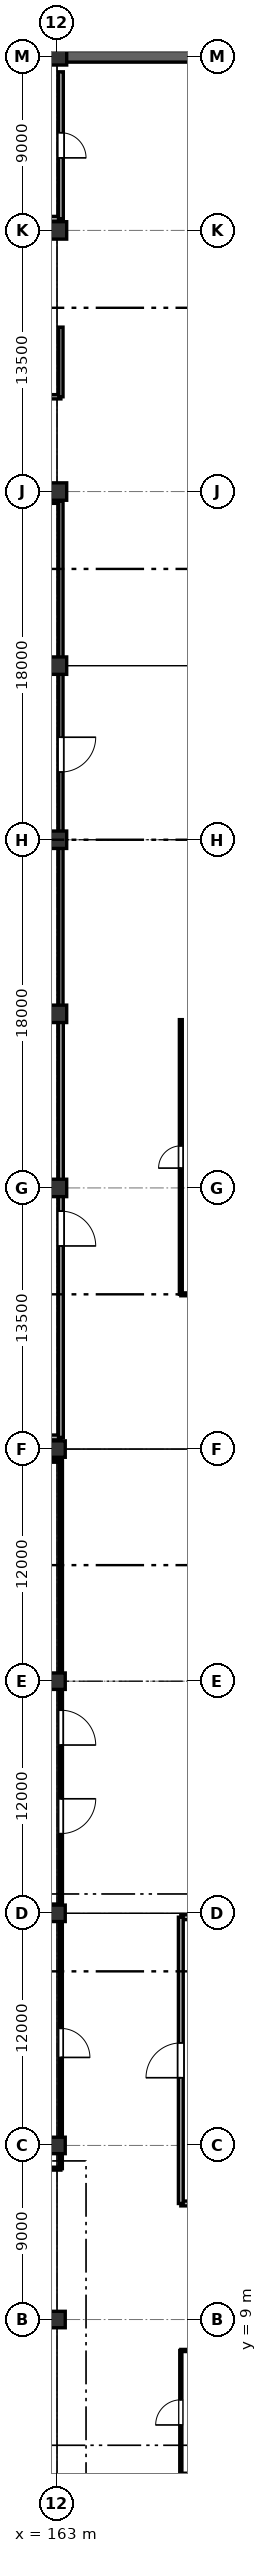
"""IFC4 building model, lengths in metres.
Left out: names, types, materials, properties, quantities, classifications, styles, units other than length and angle.
Written with IfcOpenShell. Run it as: python <this file> out.ifc"""

import sys

from ifc_helpers import new_model, si_unit, direction, frame, frame_2d, origin, origin_2d, place, context, subcontext, project, spatial, rectangle, extrude, element, fill, save


model = new_model("IFC4")
c1 = context("Model", 3, precision=1e-05, world=origin(), true_north=direction((0.0, 1.0)))
c2 = subcontext(c1, "Body", "Model", "MODEL_VIEW")
j1 = project(units=[si_unit("LENGTHUNIT", "METRE"), si_unit("PLANEANGLEUNIT", "RADIAN")], contexts=[c1])
p1 = place(None, origin())
s1 = spatial("IfcSite", under=j1, at=p1, CompositionType="ELEMENT")
p2 = place(p1, origin())
s2 = spatial("IfcBuilding", under=s1, at=p2, CompositionType="ELEMENT")
p3 = place(p2, frame((0.0, 0.0, -5.4)))
s3 = spatial("IfcBuildingStorey", under=s2, at=p3, CompositionType="ELEMENT", Elevation=-5.4)
for number, where, z_axis, x_axis in (
    (1, (163.0, 9.0, 0.0), (0.0, 0.0, 1.0), (1.0, 0.0, 0.0)),
    (2, (163.0, 18.0, 0.0), (0.0, 0.0, 1.0), (1.0, 0.0, 0.0)),
    (3, (163.0, 30.0, 0.0), (0.0, 0.0, 1.0), (1.0, 0.0, 0.0)),
    (4, (163.0, 42.0, 0.0), (0.0, 0.0, 1.0), (1.0, 0.0, 0.0)),
    (5, (163.0, 54.0, 0.0), (0.0, 0.0, 1.0), (1.0, 0.0, 0.0)),
):
    element("IfcColumn", number, at=place(p3, frame(where, z_axis=z_axis, x_axis=x_axis)), inside=s3, PredefinedType="COLUMN", context=c2, shape_type="SweptSolid", body=[
        extrude(rectangle(XDim=0.85, YDim=0.85, at=origin_2d()), origin(), (0.0, 0.0, 1.0), 5.4),
    ])
for number, where, z_axis, x_axis in (
    (6, (163.0, 67.5, 0.0), (0.0, 0.0, 1.0), (1.0, 0.0, 0.0)),
    (7, (163.0, 76.5, 0.0), (0.0, 0.0, 1.0), (1.0, 0.0, 0.0)),
    (8, (163.0, 85.5, 0.0), (0.0, 0.0, 1.0), (1.0, 0.0, 0.0)),
    (9, (163.0, 94.5, 0.0), (0.0, 0.0, 1.0), (1.0, 0.0, 0.0)),
    (10, (163.0, 103.5, 0.0), (0.0, 0.0, 1.0), (1.0, 0.0, 0.0)),
    (11, (163.0, 117.0, 0.0), (0.0, 0.0, 1.0), (1.0, 0.0, 0.0)),
    (12, (163.0, 126.0, 0.0), (0.0, 0.0, 1.0), (1.0, 0.0, 0.0)),
):
    element("IfcColumn", number, at=place(p3, frame(where, z_axis=z_axis, x_axis=x_axis)), inside=s3, PredefinedType="COLUMN", context=c2, shape_type="SweptSolid", body=[
        extrude(rectangle(XDim=1.0, YDim=0.9, at=origin_2d()), origin(), (0.0, 0.0, 1.0), 5.4),
    ])
p4 = place(p3, frame((188.0, 126.0, 0.0), z_axis=(0.0, 0.0, 1.0), x_axis=(-1.0, 0.0, 0.0)))
e13 = element("IfcWall", 13, at=p4, inside=s3, PredefinedType="USERDEFINED", context=c2, shape_type="SweptSolid", body=[
    extrude(rectangle(XDim=52.0, YDim=0.6, at=frame_2d((26.0, 0.0))), origin(), (0.0, 0.0, 1.0), 5.1),
])
for number, where, z_axis, x_axis in (
    (14, (163.2, 30.4, 0.0), (0.0, 0.0, 1.0), (-1.0, 0.0, 0.0)),
    (15, (136.8, 53.4, 0.0), (0.0, 0.0, 1.0), (1.0, 0.0, 0.0)),
):
    element("IfcWall", number, at=place(p3, frame(where, z_axis=z_axis, x_axis=x_axis)), inside=s3, PredefinedType="PARTITIONING", context=c2, shape_type="SweptSolid", body=[
        extrude(rectangle(XDim=26.4, YDim=0.16, at=frame_2d((13.2, 0.0))), origin(), (0.0, 0.0, 1.0), 4.4),
    ])
p5 = place(p3, frame((163.2, 53.4, 0.0), z_axis=(0.0, 0.0, 1.0), x_axis=(0.0, -1.0, 0.0)))
e16 = element("IfcWall", 16, at=p5, inside=s3, PredefinedType="PARTITIONING", context=c2, shape_type="SweptSolid", body=[
    extrude(rectangle(XDim=23.0, YDim=0.16, at=frame_2d((11.5, 0.0))), origin(), (0.0, 0.0, 1.0), 4.4),
])
p6 = place(p5, frame((12.9, 0.0, 0.0)))
e17 = element("IfcOpeningElement", 17, at=p6, cuts=e16, PredefinedType="OPENING", context=c2, shape_type="SweptSolid", body=[
    extrude(rectangle(XDim=1.8, YDim=2.2, at=frame_2d((0.9, 1.1))), frame((0.0, 0.09, 0.0), z_axis=(0.0, -1.0, 0.0), x_axis=(1.0, 0.0, 0.0)), (0.0, 0.0, 1.0), 0.18),
])
p7 = place(p5, frame((17.48, 0.0, 0.0)))
e18 = element("IfcOpeningElement", 18, at=p7, cuts=e16, PredefinedType="OPENING", context=c2, shape_type="SweptSolid", body=[
    extrude(rectangle(XDim=1.8, YDim=2.2, at=frame_2d((0.9, 1.1))), frame((0.0, 0.09, 0.0), z_axis=(0.0, -1.0, 0.0), x_axis=(1.0, 0.0, 0.0)), (0.0, 0.0, 1.0), 0.18),
])
p8 = place(p3, frame((163.2, 16.8, 0.0), z_axis=(0.0, 0.0, 1.0), x_axis=(-1.0, 0.0, 0.0)))
e19 = element("IfcWall", 19, at=p8, inside=s3, PredefinedType="PARTITIONING", context=c2, shape_type="SweptSolid", body=[
    extrude(rectangle(XDim=10.6, YDim=0.15, at=frame_2d((5.3, 0.0))), origin(), (0.0, 0.0, 1.0), 4.4),
])
p9 = place(p3, frame((163.2, 29.8, 0.0), z_axis=(0.0, 0.0, 1.0), x_axis=(0.0, -1.0, 0.0)))
e20 = element("IfcWall", 20, at=p9, inside=s3, PredefinedType="PARTITIONING", context=c2, shape_type="SweptSolid", body=[
    extrude(rectangle(XDim=13.0, YDim=0.15, at=frame_2d((6.5, 0.0))), origin(), (0.0, 0.0, 1.0), 4.4),
])
p10 = place(p9, frame((5.75, 0.0, 0.0)))
e21 = element("IfcOpeningElement", 21, at=p10, cuts=e20, PredefinedType="OPENING", context=c2, shape_type="SweptSolid", body=[
    extrude(rectangle(XDim=1.5, YDim=2.15, at=frame_2d((0.75, 1.075))), frame((0.0, 0.085, 0.0), z_axis=(0.0, -1.0, 0.0), x_axis=(1.0, 0.0, 0.0)), (0.0, 0.0, 1.0), 0.17),
])
for number, where, z_axis, x_axis in (
    (22, (163.2, 54.6, 0.0), (0.0, 0.0, 1.0), (-1.0, 0.0, 0.0)),
    (23, (136.8, 76.2, 0.0), (0.0, 0.0, 1.0), (1.0, 0.0, 0.0)),
):
    element("IfcWall", number, at=place(p3, frame(where, z_axis=z_axis, x_axis=x_axis)), inside=s3, PredefinedType="SOLIDWALL", context=c2, shape_type="SweptSolid", body=[
        extrude(rectangle(XDim=26.4, YDim=0.25, at=frame_2d((13.2, 0.0))), origin(), (0.0, 0.0, 1.0), 4.4),
    ])
p11 = place(p3, frame((163.2, 76.2, 0.0), z_axis=(0.0, 0.0, 1.0), x_axis=(0.0, -1.0, 0.0)))
e24 = element("IfcWall", 24, at=p11, inside=s3, PredefinedType="SOLIDWALL", context=c2, shape_type="SweptSolid", body=[
    extrude(rectangle(XDim=21.6, YDim=0.25, at=frame_2d((10.8, 0.0))), origin(), (0.0, 0.0, 1.0), 4.4),
])
p12 = place(p11, frame((9.9, 0.0, 0.0)))
e25 = element("IfcOpeningElement", 25, at=p12, cuts=e24, PredefinedType="OPENING", context=c2, shape_type="SweptSolid", body=[
    extrude(rectangle(XDim=1.8, YDim=2.2, at=frame_2d((0.9, 1.1))), frame((0.0, 0.135, 0.0), z_axis=(0.0, -1.0, 0.0), x_axis=(1.0, 0.0, 0.0)), (0.0, 0.0, 1.0), 0.27),
])
p13 = place(p3, frame((136.8, 103.0, 0.0), z_axis=(0.0, 0.0, 1.0), x_axis=(1.0, 0.0, 0.0)))
e26 = element("IfcWall", 26, at=p13, inside=s3, PredefinedType="SOLIDWALL", context=c2, shape_type="SweptSolid", body=[
    extrude(rectangle(XDim=26.4, YDim=0.22, at=frame_2d((13.2, 0.0))), origin(), (0.0, 0.0, 1.0), 4.4),
])
p14 = place(p3, frame((163.2, 103.0, 0.0), z_axis=(0.0, 0.0, 1.0), x_axis=(0.0, -1.0, 0.0)))
e27 = element("IfcWall", 27, at=p14, inside=s3, PredefinedType="SOLIDWALL", context=c2, shape_type="SweptSolid", body=[
    extrude(rectangle(XDim=26.2, YDim=0.22, at=frame_2d((13.1, 0.0))), origin(), (0.0, 0.0, 1.0), 4.4),
])
p15 = place(p14, frame((12.2, 0.0, 0.0)))
e28 = element("IfcOpeningElement", 28, at=p15, cuts=e27, PredefinedType="OPENING", context=c2, shape_type="SweptSolid", body=[
    extrude(rectangle(XDim=1.8, YDim=2.2, at=frame_2d((0.9, 1.1))), frame((0.0, 0.12, 0.0), z_axis=(0.0, -1.0, 0.0), x_axis=(1.0, 0.0, 0.0)), (0.0, 0.0, 1.0), 0.24),
])
for number, where, z_axis, x_axis in (
    (29, (187.2, 15.0, 0.0), (0.0, 0.0, 1.0), (-1.0, 0.0, 0.0)),
    (30, (169.4, 29.8, 0.0), (0.0, 0.0, 1.0), (1.0, 0.0, 0.0)),
):
    element("IfcWall", number, at=place(p3, frame(where, z_axis=z_axis, x_axis=x_axis)), inside=s3, PredefinedType="SOLIDWALL", context=c2, shape_type="SweptSolid", body=[
        extrude(rectangle(XDim=17.8, YDim=0.25, at=frame_2d((8.9, 0.0))), origin(), (0.0, 0.0, 1.0), 4.4),
    ])
p16 = place(p3, frame((169.4, 15.0, 0.0), z_axis=(0.0, 0.0, 1.0), x_axis=(0.0, 1.0, 0.0)))
e31 = element("IfcWall", 31, at=p16, inside=s3, PredefinedType="SOLIDWALL", context=c2, shape_type="SweptSolid", body=[
    extrude(rectangle(XDim=14.8, YDim=0.25, at=frame_2d((7.4, 0.0))), origin(), (0.0, 0.0, 1.0), 4.4),
])
p17 = place(p16, frame((6.5, 0.0, 0.0)))
e32 = element("IfcOpeningElement", 32, at=p17, cuts=e31, PredefinedType="OPENING", context=c2, shape_type="SweptSolid", body=[
    extrude(rectangle(XDim=1.8, YDim=2.2, at=frame_2d((0.9, 1.1))), frame((0.0, 0.135, 0.0), z_axis=(0.0, -1.0, 0.0), x_axis=(1.0, 0.0, 0.0)), (0.0, 0.0, 1.0), 0.27),
])
p18 = place(p3, frame((178.6, 62.0, 0.0), z_axis=(0.0, 0.0, 1.0), x_axis=(-1.0, 0.0, 0.0)))
e33 = element("IfcWall", 33, at=p18, inside=s3, PredefinedType="PARTITIONING", context=c2, shape_type="SweptSolid", body=[
    extrude(rectangle(XDim=9.2, YDim=0.15, at=frame_2d((4.6, 0.0))), origin(), (0.0, 0.0, 1.0), 4.4),
])
p19 = place(p3, frame((169.4, 62.0, 0.0), z_axis=(0.0, 0.0, 1.0), x_axis=(0.0, 1.0, 0.0)))
e34 = element("IfcWall", 34, at=p19, inside=s3, PredefinedType="PARTITIONING", context=c2, shape_type="SweptSolid", body=[
    extrude(rectangle(XDim=14.2, YDim=0.15, at=frame_2d((7.1, 0.0))), origin(), (0.0, 0.0, 1.0), 4.4),
])
p20 = place(p19, frame((6.525, 0.0, 0.0)))
e35 = element("IfcOpeningElement", 35, at=p20, cuts=e34, PredefinedType="OPENING", context=c2, shape_type="SweptSolid", body=[
    extrude(rectangle(XDim=1.15, YDim=2.1, at=frame_2d((0.575, 1.05))), frame((0.0, 0.085, 0.0), z_axis=(0.0, -1.0, 0.0), x_axis=(1.0, 0.0, 0.0)), (0.0, 0.0, 1.0), 0.17),
])
for number, where, z_axis, x_axis in (
    (36, (187.2, 1.0, 0.0), (0.0, 0.0, 1.0), (-1.0, 0.0, 0.0)),
    (37, (169.4, 7.4, 0.0), (0.0, 0.0, 1.0), (1.0, 0.0, 0.0)),
):
    element("IfcWall", number, at=place(p3, frame(where, z_axis=z_axis, x_axis=x_axis)), inside=s3, PredefinedType="PARTITIONING", context=c2, shape_type="SweptSolid", body=[
        extrude(rectangle(XDim=17.8, YDim=0.11, at=frame_2d((8.9, 0.0))), origin(), (0.0, 0.0, 1.0), 4.4),
    ])
p21 = place(p3, frame((169.4, 1.0, 0.0), z_axis=(0.0, 0.0, 1.0), x_axis=(0.0, 1.0, 0.0)))
e38 = element("IfcWall", 38, at=p21, inside=s3, PredefinedType="PARTITIONING", context=c2, shape_type="SweptSolid", body=[
    extrude(rectangle(XDim=6.4, YDim=0.11, at=frame_2d((3.2, 0.0))), origin(), (0.0, 0.0, 1.0), 4.4),
])
p22 = place(p21, frame((2.55, 0.0, 0.0)))
e39 = element("IfcOpeningElement", 39, at=p22, cuts=e38, PredefinedType="OPENING", context=c2, shape_type="SweptSolid", body=[
    extrude(rectangle(XDim=1.3, YDim=2.1, at=frame_2d((0.65, 1.05))), frame((0.0, 0.065, 0.0), z_axis=(0.0, -1.0, 0.0), x_axis=(1.0, 0.0, 0.0)), (0.0, 0.0, 1.0), 0.13),
])
p23 = place(p3, frame((163.2, 108.4, 0.0), z_axis=(0.0, 0.0, 1.0), x_axis=(-1.0, 0.0, 0.0)))
e40 = element("IfcWall", 40, at=p23, inside=s3, PredefinedType="SOLIDWALL", context=c2, shape_type="SweptSolid", body=[
    extrude(rectangle(XDim=16.6, YDim=0.22, at=frame_2d((8.3, 0.0))), origin(), (0.0, 0.0, 1.0), 4.4),
])
p24 = place(p23, frame((7.65, 0.0, 0.0)))
e41 = element("IfcOpeningElement", 41, at=p24, cuts=e40, PredefinedType="OPENING", context=c2, shape_type="SweptSolid", body=[
    extrude(rectangle(XDim=1.3, YDim=2.1, at=frame_2d((0.65, 1.05))), frame((0.0, 0.12, 0.0), z_axis=(0.0, -1.0, 0.0), x_axis=(1.0, 0.0, 0.0)), (0.0, 0.0, 1.0), 0.24),
])
p25 = place(p3, frame((163.2, 112.0, 0.0), z_axis=(0.0, 0.0, 1.0), x_axis=(0.0, -1.0, 0.0)))
e42 = element("IfcWall", 42, at=p25, inside=s3, PredefinedType="SOLIDWALL", context=c2, shape_type="SweptSolid", body=[
    extrude(rectangle(XDim=3.6, YDim=0.22, at=frame_2d((1.8, 0.0))), origin(), (0.0, 0.0, 1.0), 4.4),
])
p26 = place(p3, frame((163.2, 117.6, 0.0), z_axis=(0.0, 0.0, 1.0), x_axis=(-1.0, 0.0, 0.0)))
e43 = element("IfcWall", 43, at=p26, inside=s3, PredefinedType="SOLIDWALL", context=c2, shape_type="SweptSolid", body=[
    extrude(rectangle(XDim=16.0, YDim=0.25, at=frame_2d((8.0, 0.0))), origin(), (0.0, 0.0, 1.0), 4.4),
])
p27 = place(p3, frame((163.2, 125.2, 0.0), z_axis=(0.0, 0.0, 1.0), x_axis=(0.0, -1.0, 0.0)))
e44 = element("IfcWall", 44, at=p27, inside=s3, PredefinedType="SOLIDWALL", context=c2, shape_type="SweptSolid", body=[
    extrude(rectangle(XDim=7.6, YDim=0.25, at=frame_2d((3.8, 0.0))), origin(), (0.0, 0.0, 1.0), 4.4),
])
p28 = place(p27, frame((3.15, 0.0, 0.0)))
e45 = element("IfcOpeningElement", 45, at=p28, cuts=e44, PredefinedType="OPENING", context=c2, shape_type="SweptSolid", body=[
    extrude(rectangle(XDim=1.3, YDim=2.1, at=frame_2d((0.65, 1.05))), frame((0.0, 0.135, 0.0), z_axis=(0.0, -1.0, 0.0), x_axis=(1.0, 0.0, 0.0)), (0.0, 0.0, 1.0), 0.27),
])
p29 = place(p6, origin())
e46 = element("IfcDoor", 46, at=p29, inside=s3, OperationType="SINGLE_SWING_RIGHT", PredefinedType="DOOR", context=c2, shape_type="SweptSolid", body=[
    extrude(rectangle(XDim=1.8, YDim=2.2, at=frame_2d((0.9, 1.1))), frame((0.0, 0.025, 0.0), z_axis=(0.0, -1.0, 0.0), x_axis=(1.0, 0.0, 0.0)), (0.0, 0.0, 1.0), 0.05),
])
fill(e17, e46)
p30 = place(p7, origin())
e47 = element("IfcDoor", 47, at=p30, inside=s3, OperationType="SINGLE_SWING_LEFT", PredefinedType="DOOR", context=c2, shape_type="SweptSolid", body=[
    extrude(rectangle(XDim=1.8, YDim=2.2, at=frame_2d((0.9, 1.1))), frame((0.0, 0.025, 0.0), z_axis=(0.0, -1.0, 0.0), x_axis=(1.0, 0.0, 0.0)), (0.0, 0.0, 1.0), 0.05),
])
fill(e18, e47)
p31 = place(p10, origin())
e48 = element("IfcDoor", 48, at=p31, inside=s3, OperationType="SINGLE_SWING_RIGHT", PredefinedType="DOOR", context=c2, shape_type="SweptSolid", body=[
    extrude(rectangle(XDim=1.5, YDim=2.15, at=frame_2d((0.75, 1.075))), frame((0.0, 0.025, 0.0), z_axis=(0.0, -1.0, 0.0), x_axis=(1.0, 0.0, 0.0)), (0.0, 0.0, 1.0), 0.05),
])
fill(e21, e48)
p32 = place(p12, origin())
e49 = element("IfcDoor", 49, at=p32, inside=s3, OperationType="SINGLE_SWING_RIGHT", PredefinedType="DOOR", context=c2, shape_type="SweptSolid", body=[
    extrude(rectangle(XDim=1.8, YDim=2.2, at=frame_2d((0.9, 1.1))), frame((0.0, 0.025, 0.0), z_axis=(0.0, -1.0, 0.0), x_axis=(1.0, 0.0, 0.0)), (0.0, 0.0, 1.0), 0.05),
])
fill(e25, e49)
p33 = place(p15, origin())
e50 = element("IfcDoor", 50, at=p33, inside=s3, OperationType="SINGLE_SWING_LEFT", PredefinedType="DOOR", context=c2, shape_type="SweptSolid", body=[
    extrude(rectangle(XDim=1.8, YDim=2.2, at=frame_2d((0.9, 1.1))), frame((0.0, 0.025, 0.0), z_axis=(0.0, -1.0, 0.0), x_axis=(1.0, 0.0, 0.0)), (0.0, 0.0, 1.0), 0.05),
])
fill(e28, e50)
p34 = place(p17, origin())
e51 = element("IfcDoor", 51, at=p34, inside=s3, OperationType="SINGLE_SWING_LEFT", PredefinedType="DOOR", context=c2, shape_type="SweptSolid", body=[
    extrude(rectangle(XDim=1.8, YDim=2.2, at=frame_2d((0.9, 1.1))), frame((0.0, 0.025, 0.0), z_axis=(0.0, -1.0, 0.0), x_axis=(1.0, 0.0, 0.0)), (0.0, 0.0, 1.0), 0.05),
])
fill(e32, e51)
p35 = place(p20, origin())
e52 = element("IfcDoor", 52, at=p35, inside=s3, OperationType="SINGLE_SWING_LEFT", PredefinedType="DOOR", context=c2, shape_type="SweptSolid", body=[
    extrude(rectangle(XDim=1.15, YDim=2.1, at=frame_2d((0.575, 1.05))), frame((0.0, 0.025, 0.0), z_axis=(0.0, -1.0, 0.0), x_axis=(1.0, 0.0, 0.0)), (0.0, 0.0, 1.0), 0.05),
])
fill(e35, e52)
p36 = place(p22, origin())
e53 = element("IfcDoor", 53, at=p36, inside=s3, OperationType="SINGLE_SWING_LEFT", PredefinedType="DOOR", context=c2, shape_type="SweptSolid", body=[
    extrude(rectangle(XDim=1.3, YDim=2.1, at=frame_2d((0.65, 1.05))), frame((0.0, 0.025, 0.0), z_axis=(0.0, -1.0, 0.0), x_axis=(1.0, 0.0, 0.0)), (0.0, 0.0, 1.0), 0.05),
])
fill(e39, e53)
p37 = place(p28, origin())
e54 = element("IfcDoor", 54, at=p37, inside=s3, OperationType="SINGLE_SWING_RIGHT", PredefinedType="DOOR", context=c2, shape_type="SweptSolid", body=[
    extrude(rectangle(XDim=1.3, YDim=2.1, at=frame_2d((0.65, 1.05))), frame((0.0, 0.025, 0.0), z_axis=(0.0, -1.0, 0.0), x_axis=(1.0, 0.0, 0.0)), (0.0, 0.0, 1.0), 0.05),
])
fill(e45, e54)
save(model, sys.argv[1])
